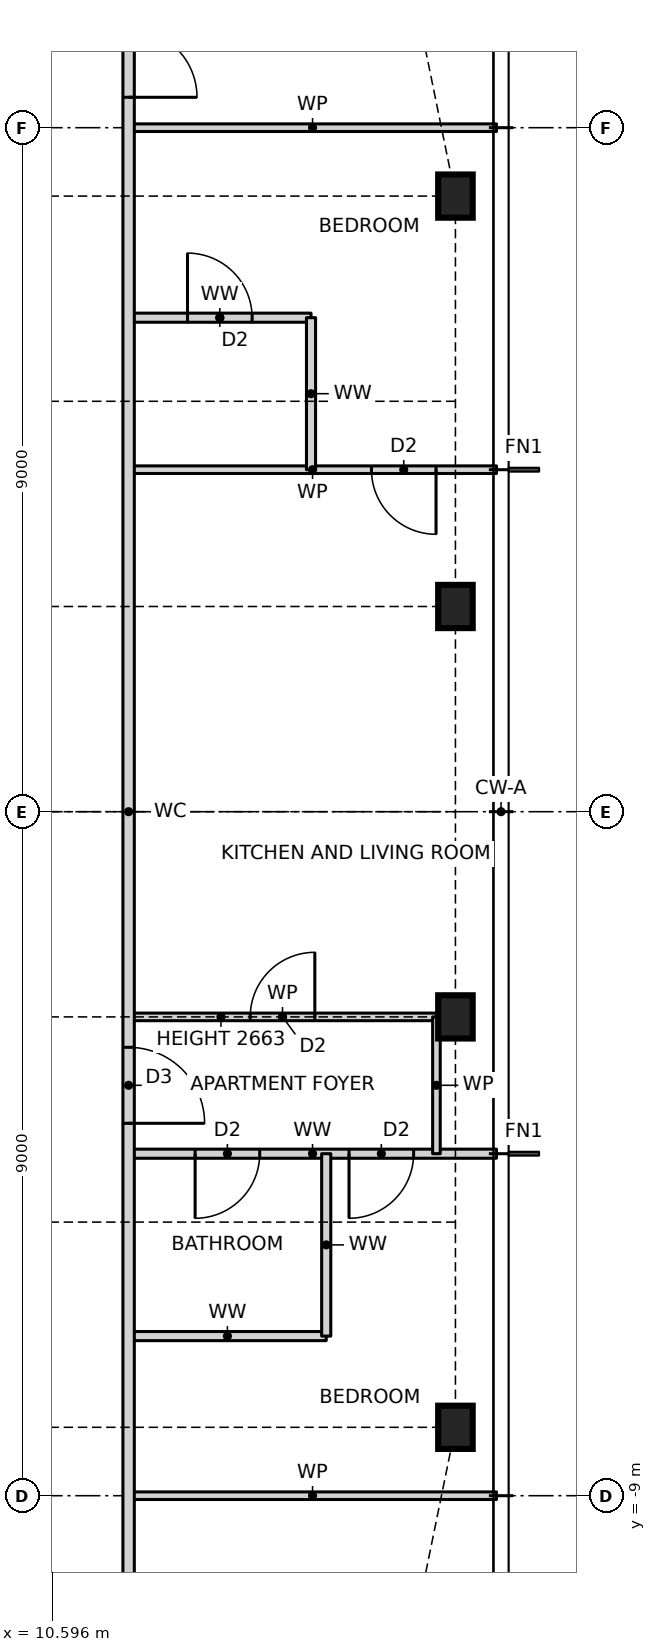
"""IFC4 building model, lengths in metres.
Left out: names, types, materials, properties, quantities, classifications, styles, units other than length and angle.
Written with IfcOpenShell. Run it as: python <this file> out.ifc"""

import sys

from ifc_helpers import new_model, si_unit, direction, frame, frame_2d, origin, origin_2d, place, context, subcontext, project, spatial, rectangle, i_section, extrude, element, fill, save


model = new_model("IFC4")
c1 = context("Model", 3, precision=1e-05, world=origin(), true_north=direction((0.0, 1.0)))
c2 = subcontext(c1, "Body", "Model", "MODEL_VIEW")
j1 = project(units=[si_unit("LENGTHUNIT", "METRE"), si_unit("PLANEANGLEUNIT", "RADIAN")], contexts=[c1])
p1 = place(None, origin())
s1 = spatial("IfcSite", under=j1, at=p1, CompositionType="ELEMENT")
p2 = place(p1, origin())
s2 = spatial("IfcBuilding", under=s1, at=p2, CompositionType="ELEMENT")
p3 = place(p2, frame((0.0, 0.0, 246.5)))
s3 = spatial("IfcBuildingStorey", under=s2, at=p3, CompositionType="ELEMENT", Elevation=246.5)
for number, where, z_axis, x_axis in (
    (1, (15.9, -8.1, 0.0), (0.0, 0.0, 1.0), (1.0, 0.0, 0.0)),
    (2, (15.9, -2.7, 0.0), (0.0, 0.0, 1.0), (1.0, 0.0, 0.0)),
    (3, (15.9, 2.7, 0.0), (0.0, 0.0, 1.0), (1.0, 0.0, 0.0)),
    (4, (15.9, 8.1, 0.0), (0.0, 0.0, 1.0), (1.0, 0.0, 0.0)),
):
    element("IfcColumn", number, at=place(p3, frame(where, z_axis=z_axis, x_axis=x_axis)), inside=s3, PredefinedType="COLUMN", context=c2, shape_type="SweptSolid", body=[
        extrude(i_section(OverallWidth=0.455, OverallDepth=0.569, WebThickness=0.078, FlangeThickness=0.125, at=origin_2d()), origin(), (0.0, 0.0, 1.0), 3.5),
    ])
p4 = place(p3, frame((11.6, -9.0, 0.0), z_axis=(0.0, 0.0, 1.0), x_axis=(1.0, 0.0, 0.0)))
e5 = element("IfcWall", 5, at=p4, inside=s3, PredefinedType="PARTITIONING", context=c2, shape_type="SweptSolid", body=[
    extrude(rectangle(XDim=4.84, YDim=0.1, at=frame_2d((2.42, 0.0))), origin(), (0.0, 0.0, 1.0), 3.27),
])
p5 = place(p3, frame((11.6, -6.9, 0.0), z_axis=(0.0, 0.0, 1.0), x_axis=(1.0, 0.0, 0.0)))
e6 = element("IfcWall", 6, at=p5, inside=s3, PredefinedType="PARTITIONING", context=c2, shape_type="SweptSolid", body=[
    extrude(rectangle(XDim=2.6, YDim=0.12, at=frame_2d((1.3, 0.0))), origin(), (0.0, 0.0, 1.0), 3.27),
])
p6 = place(p3, frame((11.6, -4.5, 0.0), z_axis=(0.0, 0.0, 1.0), x_axis=(1.0, 0.0, 0.0)))
e7 = element("IfcWall", 7, at=p6, inside=s3, PredefinedType="PARTITIONING", context=c2, shape_type="SweptSolid", body=[
    extrude(rectangle(XDim=4.84, YDim=0.12, at=frame_2d((2.42, 0.0))), origin(), (0.0, 0.0, 1.0), 3.27),
])
p7 = place(p6, frame((2.9, 0.0, 0.0)))
e8 = element("IfcOpeningElement", 8, at=p7, cuts=e7, PredefinedType="OPENING", context=c2, shape_type="SweptSolid", body=[
    extrude(rectangle(XDim=0.85, YDim=2.1, at=frame_2d((0.425, 1.05))), frame((0.0, 0.07, 0.0), z_axis=(0.0, -1.0, 0.0), x_axis=(1.0, 0.0, 0.0)), (0.0, 0.0, 1.0), 0.14),
])
p8 = place(p6, frame((0.875, 0.0, 0.0)))
e9 = element("IfcOpeningElement", 9, at=p8, cuts=e7, PredefinedType="OPENING", context=c2, shape_type="SweptSolid", body=[
    extrude(rectangle(XDim=0.85, YDim=2.1, at=frame_2d((0.425, 1.05))), frame((0.0, 0.07, 0.0), z_axis=(0.0, -1.0, 0.0), x_axis=(1.0, 0.0, 0.0)), (0.0, 0.0, 1.0), 0.14),
])
p9 = place(p3, frame((11.6, -2.7, 0.0), z_axis=(0.0, 0.0, 1.0), x_axis=(1.0, 0.0, 0.0)))
e10 = element("IfcWall", 10, at=p9, inside=s3, PredefinedType="PARTITIONING", context=c2, shape_type="SweptSolid", body=[
    extrude(rectangle(XDim=4.05, YDim=0.1, at=frame_2d((2.025, 0.0))), origin(), (0.0, 0.0, 1.0), 2.663),
])
p10 = place(p9, frame((1.6, 0.0, 0.0)))
e11 = element("IfcOpeningElement", 11, at=p10, cuts=e10, PredefinedType="OPENING", context=c2, shape_type="SweptSolid", body=[
    extrude(rectangle(XDim=0.85, YDim=2.1, at=frame_2d((0.425, 1.05))), frame((0.0, 0.06, 0.0), z_axis=(0.0, -1.0, 0.0), x_axis=(1.0, 0.0, 0.0)), (0.0, 0.0, 1.0), 0.12),
])
p11 = place(p3, frame((11.6, 4.5, 0.0), z_axis=(0.0, 0.0, 1.0), x_axis=(1.0, 0.0, 0.0)))
e12 = element("IfcWall", 12, at=p11, inside=s3, PredefinedType="PARTITIONING", context=c2, shape_type="SweptSolid", body=[
    extrude(rectangle(XDim=4.84, YDim=0.1, at=frame_2d((2.42, 0.0))), origin(), (0.0, 0.0, 1.0), 3.27),
])
p12 = place(p11, frame((3.195, 0.0, 0.0)))
e13 = element("IfcOpeningElement", 13, at=p12, cuts=e12, PredefinedType="OPENING", context=c2, shape_type="SweptSolid", body=[
    extrude(rectangle(XDim=0.85, YDim=2.1, at=frame_2d((0.425, 1.05))), frame((0.0, 0.06, 0.0), z_axis=(0.0, -1.0, 0.0), x_axis=(1.0, 0.0, 0.0)), (0.0, 0.0, 1.0), 0.12),
])
p13 = place(p3, frame((11.6, 6.5, 0.0), z_axis=(0.0, 0.0, 1.0), x_axis=(1.0, 0.0, 0.0)))
e14 = element("IfcWall", 14, at=p13, inside=s3, PredefinedType="PARTITIONING", context=c2, shape_type="SweptSolid", body=[
    extrude(rectangle(XDim=2.4, YDim=0.12, at=frame_2d((1.2, 0.0))), origin(), (0.0, 0.0, 1.0), 3.27),
])
p14 = place(p13, frame((0.775, 0.0, 0.0)))
e15 = element("IfcOpeningElement", 15, at=p14, cuts=e14, PredefinedType="OPENING", context=c2, shape_type="SweptSolid", body=[
    extrude(rectangle(XDim=0.85, YDim=2.1, at=frame_2d((0.425, 1.05))), frame((0.0, 0.07, 0.0), z_axis=(0.0, -1.0, 0.0), x_axis=(1.0, 0.0, 0.0)), (0.0, 0.0, 1.0), 0.14),
])
p15 = place(p3, frame((11.6, 9.0, 0.0), z_axis=(0.0, 0.0, 1.0), x_axis=(1.0, 0.0, 0.0)))
e16 = element("IfcWall", 16, at=p15, inside=s3, PredefinedType="PARTITIONING", context=c2, shape_type="SweptSolid", body=[
    extrude(rectangle(XDim=4.84, YDim=0.1, at=frame_2d((2.42, 0.0))), origin(), (0.0, 0.0, 1.0), 3.27),
])
p16 = place(p3, frame((15.65, -4.5, 0.0), z_axis=(0.0, 0.0, 1.0), x_axis=(0.0, 1.0, 0.0)))
e17 = element("IfcWall", 17, at=p16, inside=s3, PredefinedType="PARTITIONING", context=c2, shape_type="SweptSolid", body=[
    extrude(rectangle(XDim=1.8, YDim=0.1, at=frame_2d((0.9, 0.0))), origin(), (0.0, 0.0, 1.0), 3.27),
])
p17 = place(p3, frame((14.2, -6.9, 0.0), z_axis=(0.0, 0.0, 1.0), x_axis=(0.0, 1.0, 0.0)))
e18 = element("IfcWall", 18, at=p17, inside=s3, PredefinedType="PARTITIONING", context=c2, shape_type="SweptSolid", body=[
    extrude(rectangle(XDim=2.4, YDim=0.12, at=frame_2d((1.2, 0.0))), origin(), (0.0, 0.0, 1.0), 3.27),
])
p18 = place(p3, frame((14.0, 4.5, 0.0), z_axis=(0.0, 0.0, 1.0), x_axis=(0.0, 1.0, 0.0)))
e19 = element("IfcWall", 19, at=p18, inside=s3, PredefinedType="PARTITIONING", context=c2, shape_type="SweptSolid", body=[
    extrude(rectangle(XDim=2.0, YDim=0.12, at=frame_2d((1.0, 0.0))), origin(), (0.0, 0.0, 1.0), 3.27),
])
p19 = place(p3, frame((11.6, -11.6, 0.0), z_axis=(0.0, 0.0, 1.0), x_axis=(0.0, 1.0, 0.0)))
e20 = element("IfcWall", 20, at=p19, inside=s3, PredefinedType="PARTITIONING", context=c2, shape_type="SweptSolid", body=[
    extrude(rectangle(XDim=23.2, YDim=0.15, at=frame_2d((11.6, 0.0))), origin(), (0.0, 0.0, 1.0), 3.27),
])
p20 = place(p19, frame((7.5, 0.0, 0.0)))
e21 = element("IfcOpeningElement", 21, at=p20, cuts=e20, PredefinedType="OPENING", context=c2, shape_type="SweptSolid", body=[
    extrude(rectangle(XDim=1.0, YDim=2.1, at=frame_2d((0.5, 1.05))), frame((0.0, 0.085, 0.0), z_axis=(0.0, -1.0, 0.0), x_axis=(1.0, 0.0, 0.0)), (0.0, 0.0, 1.0), 0.17),
])
p21 = place(p19, frame((21.0, 0.0, 0.0)))
e22 = element("IfcOpeningElement", 22, at=p21, cuts=e20, PredefinedType="OPENING", context=c2, shape_type="SweptSolid", body=[
    extrude(rectangle(XDim=1.8, YDim=2.1, at=frame_2d((0.9, 1.05))), frame((0.0, 0.085, 0.0), z_axis=(0.0, -1.0, 0.0), x_axis=(1.0, 0.0, 0.0)), (0.0, 0.0, 1.0), 0.17),
])
p22 = place(p20, frame((1.0, 0.0, 0.0), z_axis=(0.0, 0.0, 1.0), x_axis=(-1.0, 0.0, 0.0)))
e23 = element("IfcDoor", 23, at=p22, inside=s3, OperationType="SINGLE_SWING_RIGHT", PredefinedType="DOOR", context=c2, shape_type="SweptSolid", body=[
    extrude(rectangle(XDim=1.0, YDim=2.1, at=frame_2d((0.5, 1.05))), frame((0.0, 0.025, 0.0), z_axis=(0.0, -1.0, 0.0), x_axis=(1.0, 0.0, 0.0)), (0.0, 0.0, 1.0), 0.05),
])
fill(e21, e23)
p23 = place(p10, origin())
e24 = element("IfcDoor", 24, at=p23, inside=s3, OperationType="SINGLE_SWING_RIGHT", PredefinedType="DOOR", context=c2, shape_type="SweptSolid", body=[
    extrude(rectangle(XDim=0.85, YDim=2.1, at=frame_2d((0.425, 1.05))), frame((0.0, 0.025, 0.0), z_axis=(0.0, -1.0, 0.0), x_axis=(1.0, 0.0, 0.0)), (0.0, 0.0, 1.0), 0.05),
])
fill(e11, e24)
p24 = place(p7, frame((0.85, 0.0, 0.0), z_axis=(0.0, 0.0, 1.0), x_axis=(-1.0, 0.0, 0.0)))
e25 = element("IfcDoor", 25, at=p24, inside=s3, OperationType="SINGLE_SWING_RIGHT", PredefinedType="DOOR", context=c2, shape_type="SweptSolid", body=[
    extrude(rectangle(XDim=0.85, YDim=2.1, at=frame_2d((0.425, 1.05))), frame((0.0, 0.025, 0.0), z_axis=(0.0, -1.0, 0.0), x_axis=(1.0, 0.0, 0.0)), (0.0, 0.0, 1.0), 0.05),
])
fill(e8, e25)
p25 = place(p8, frame((0.85, 0.0, 0.0), z_axis=(0.0, 0.0, 1.0), x_axis=(-1.0, 0.0, 0.0)))
e26 = element("IfcDoor", 26, at=p25, inside=s3, OperationType="SINGLE_SWING_RIGHT", PredefinedType="DOOR", context=c2, shape_type="SweptSolid", body=[
    extrude(rectangle(XDim=0.85, YDim=2.1, at=frame_2d((0.425, 1.05))), frame((0.0, 0.025, 0.0), z_axis=(0.0, -1.0, 0.0), x_axis=(1.0, 0.0, 0.0)), (0.0, 0.0, 1.0), 0.05),
])
fill(e9, e26)
p26 = place(p12, frame((0.85, 0.0, 0.0), z_axis=(0.0, 0.0, 1.0), x_axis=(-1.0, 0.0, 0.0)))
e27 = element("IfcDoor", 27, at=p26, inside=s3, OperationType="SINGLE_SWING_LEFT", PredefinedType="DOOR", context=c2, shape_type="SweptSolid", body=[
    extrude(rectangle(XDim=0.85, YDim=2.1, at=frame_2d((0.425, 1.05))), frame((0.0, 0.025, 0.0), z_axis=(0.0, -1.0, 0.0), x_axis=(1.0, 0.0, 0.0)), (0.0, 0.0, 1.0), 0.05),
])
fill(e13, e27)
p27 = place(p14, origin())
e28 = element("IfcDoor", 28, at=p27, inside=s3, OperationType="SINGLE_SWING_LEFT", PredefinedType="DOOR", context=c2, shape_type="SweptSolid", body=[
    extrude(rectangle(XDim=0.85, YDim=2.1, at=frame_2d((0.425, 1.05))), frame((0.0, 0.025, 0.0), z_axis=(0.0, -1.0, 0.0), x_axis=(1.0, 0.0, 0.0)), (0.0, 0.0, 1.0), 0.05),
])
fill(e15, e28)
p28 = place(p21, frame((1.8, 0.0, 0.0), z_axis=(0.0, 0.0, 1.0), x_axis=(-1.0, 0.0, 0.0)))
e29 = element("IfcDoor", 29, at=p28, inside=s3, OperationType="DOUBLE_DOOR_SINGLE_SWING", PredefinedType="DOOR", context=c2, shape_type="SweptSolid", body=[
    extrude(rectangle(XDim=1.8, YDim=2.1, at=frame_2d((0.9, 1.05))), frame((0.0, 0.025, 0.0), z_axis=(0.0, -1.0, 0.0), x_axis=(1.0, 0.0, 0.0)), (0.0, 0.0, 1.0), 0.05),
])
fill(e22, e29)
save(model, sys.argv[1])
